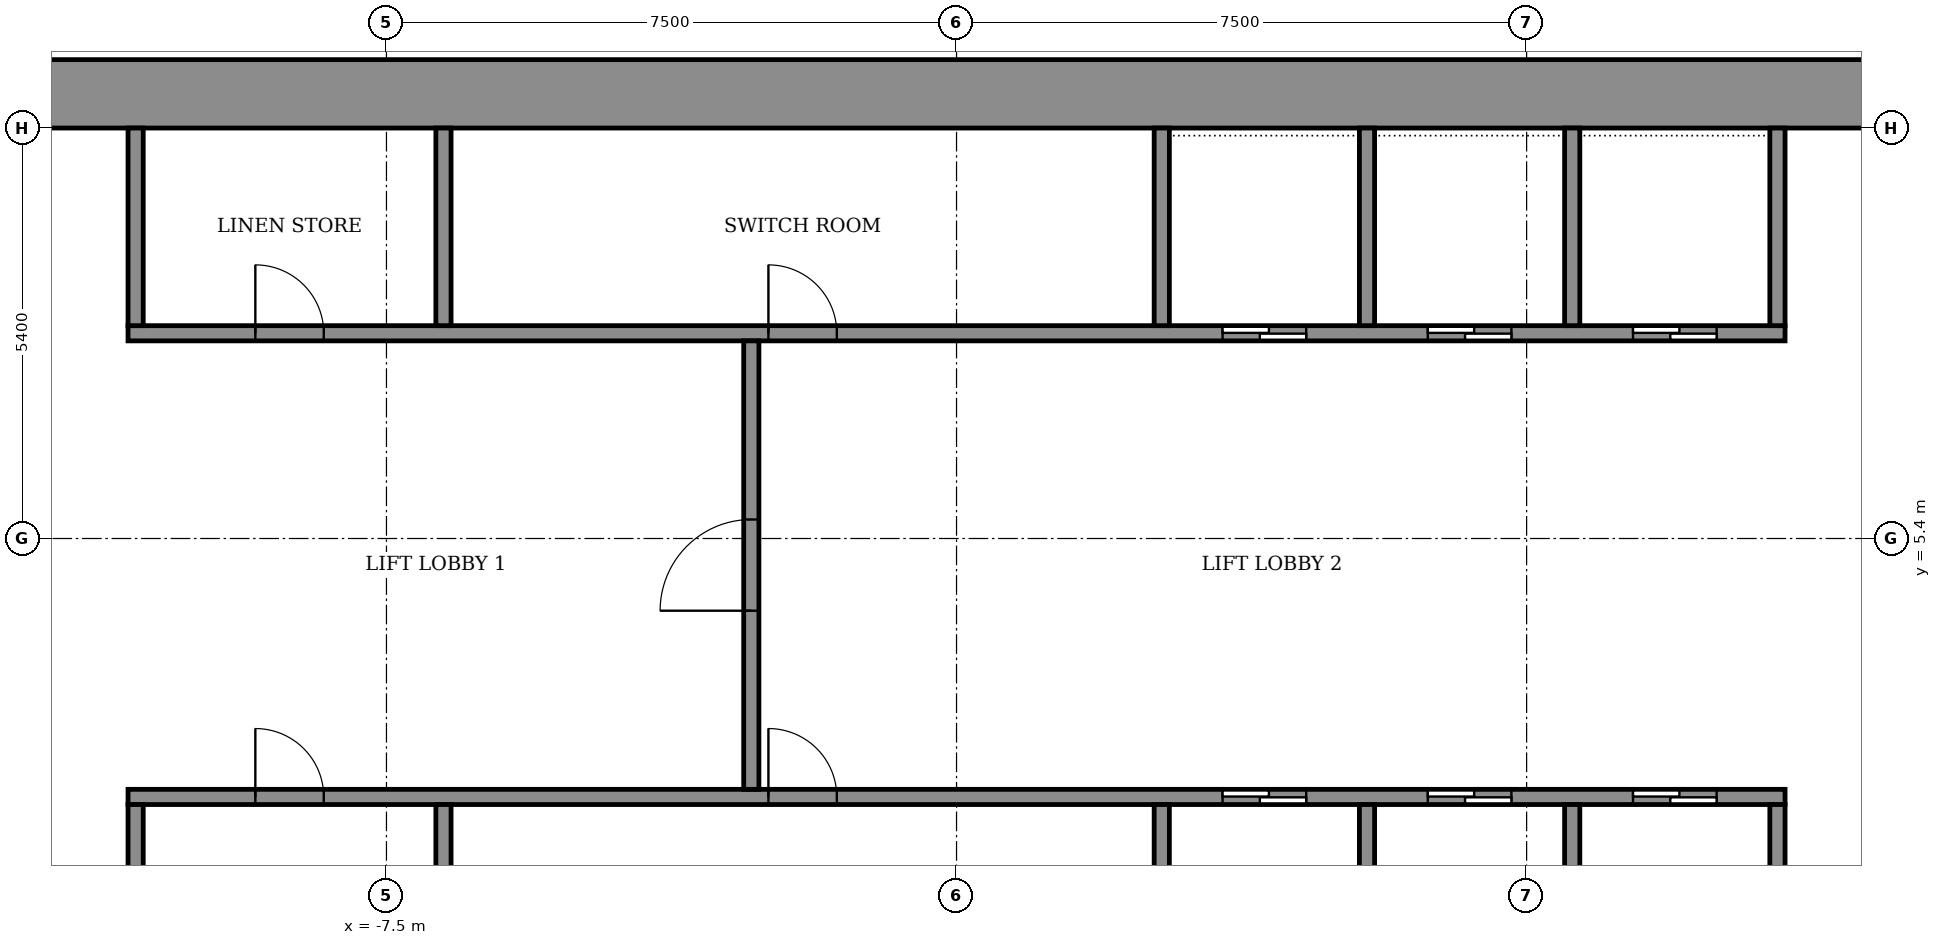
"""IFC4 building model, lengths in metres.
Left out: names, types, materials, properties, quantities, classifications, styles, units other than length and angle.
Written with IfcOpenShell. Run it as: python <this file> out.ifc"""

import sys

from ifc_helpers import new_model, si_unit, direction, frame, frame_2d, origin, place, context, subcontext, project, spatial, rectangle, extrude, element, fill, save


model = new_model("IFC4")
c1 = context("Model", 3, precision=1e-05, world=origin(), true_north=direction((0.0, 1.0)))
c2 = subcontext(c1, "Body", "Model", "MODEL_VIEW")
j1 = project(units=[si_unit("LENGTHUNIT", "METRE"), si_unit("PLANEANGLEUNIT", "RADIAN")], contexts=[c1])
p1 = place(None, origin())
s1 = spatial("IfcSite", under=j1, at=p1, CompositionType="ELEMENT")
p2 = place(p1, origin())
s2 = spatial("IfcBuilding", under=s1, at=p2, CompositionType="ELEMENT")
p3 = place(p2, frame((0.0, 0.0, 140.9)))
s3 = spatial("IfcBuildingStorey", under=s2, at=p3, CompositionType="ELEMENT", Elevation=140.9)
p4 = place(p3, frame((-14.7, 11.25, 0.0), z_axis=(0.0, 0.0, 1.0), x_axis=(1.0, 0.0, 0.0)))
e1 = element("IfcWall", 1, at=p4, inside=s3, PredefinedType="SHEAR", context=c2, shape_type="SweptSolid", body=[
    extrude(rectangle(XDim=29.4, YDim=0.9, at=frame_2d((14.7, 0.0))), origin(), (0.0, 0.0, 1.0), 3.6),
])
p5 = place(p3, frame((-10.9, 2.0, 0.0), z_axis=(0.0, 0.0, 1.0), x_axis=(1.0, 0.0, 0.0)))
e2 = element("IfcWall", 2, at=p5, inside=s3, PredefinedType="SHEAR", context=c2, shape_type="SweptSolid", body=[
    extrude(rectangle(XDim=21.8, YDim=0.2, at=frame_2d((10.9, 0.0))), origin(), (0.0, 0.0, 1.0), 3.05),
])
p6 = place(p5, frame((14.4, 0.0, 0.0)))
e3 = element("IfcOpeningElement", 3, at=p6, cuts=e2, PredefinedType="OPENING", context=c2, shape_type="SweptSolid", body=[
    extrude(rectangle(XDim=1.1, YDim=2.1, at=frame_2d((0.55, 1.05))), frame((0.0, 0.11, 0.0), z_axis=(0.0, -1.0, 0.0), x_axis=(1.0, 0.0, 0.0)), (0.0, 0.0, 1.0), 0.22),
])
p7 = place(p5, frame((17.1, 0.0, 0.0)))
e4 = element("IfcOpeningElement", 4, at=p7, cuts=e2, PredefinedType="OPENING", context=c2, shape_type="SweptSolid", body=[
    extrude(rectangle(XDim=1.1, YDim=2.1, at=frame_2d((0.55, 1.05))), frame((0.0, 0.11, 0.0), z_axis=(0.0, -1.0, 0.0), x_axis=(1.0, 0.0, 0.0)), (0.0, 0.0, 1.0), 0.22),
])
p8 = place(p5, frame((19.8, 0.0, 0.0)))
e5 = element("IfcOpeningElement", 5, at=p8, cuts=e2, PredefinedType="OPENING", context=c2, shape_type="SweptSolid", body=[
    extrude(rectangle(XDim=1.1, YDim=2.1, at=frame_2d((0.55, 1.05))), frame((0.0, 0.11, 0.0), z_axis=(0.0, -1.0, 0.0), x_axis=(1.0, 0.0, 0.0)), (0.0, 0.0, 1.0), 0.22),
])
p9 = place(p5, frame((1.675, 0.0, 0.0)))
e6 = element("IfcOpeningElement", 6, at=p9, cuts=e2, PredefinedType="OPENING", context=c2, shape_type="SweptSolid", body=[
    extrude(rectangle(XDim=0.9, YDim=2.1, at=frame_2d((0.45, 1.05))), frame((0.0, 0.11, 0.0), z_axis=(0.0, -1.0, 0.0), x_axis=(1.0, 0.0, 0.0)), (0.0, 0.0, 1.0), 0.22),
])
p10 = place(p5, frame((8.425, 0.0, 0.0)))
e7 = element("IfcOpeningElement", 7, at=p10, cuts=e2, PredefinedType="OPENING", context=c2, shape_type="SweptSolid", body=[
    extrude(rectangle(XDim=0.9, YDim=2.1, at=frame_2d((0.45, 1.05))), frame((0.0, 0.11, 0.0), z_axis=(0.0, -1.0, 0.0), x_axis=(1.0, 0.0, 0.0)), (0.0, 0.0, 1.0), 0.22),
])
p11 = place(p3, frame((-10.9, 8.1, 0.0), z_axis=(0.0, 0.0, 1.0), x_axis=(1.0, 0.0, 0.0)))
e8 = element("IfcWall", 8, at=p11, inside=s3, PredefinedType="SHEAR", context=c2, shape_type="SweptSolid", body=[
    extrude(rectangle(XDim=21.8, YDim=0.2, at=frame_2d((10.9, 0.0))), origin(), (0.0, 0.0, 1.0), 3.05),
])
p12 = place(p11, frame((14.4, 0.0, 0.0)))
e9 = element("IfcOpeningElement", 9, at=p12, cuts=e8, PredefinedType="OPENING", context=c2, shape_type="SweptSolid", body=[
    extrude(rectangle(XDim=1.1, YDim=2.1, at=frame_2d((0.55, 1.05))), frame((0.0, 0.11, 0.0), z_axis=(0.0, -1.0, 0.0), x_axis=(1.0, 0.0, 0.0)), (0.0, 0.0, 1.0), 0.22),
])
p13 = place(p11, frame((17.1, 0.0, 0.0)))
e10 = element("IfcOpeningElement", 10, at=p13, cuts=e8, PredefinedType="OPENING", context=c2, shape_type="SweptSolid", body=[
    extrude(rectangle(XDim=1.1, YDim=2.1, at=frame_2d((0.55, 1.05))), frame((0.0, 0.11, 0.0), z_axis=(0.0, -1.0, 0.0), x_axis=(1.0, 0.0, 0.0)), (0.0, 0.0, 1.0), 0.22),
])
p14 = place(p11, frame((19.8, 0.0, 0.0)))
e11 = element("IfcOpeningElement", 11, at=p14, cuts=e8, PredefinedType="OPENING", context=c2, shape_type="SweptSolid", body=[
    extrude(rectangle(XDim=1.1, YDim=2.1, at=frame_2d((0.55, 1.05))), frame((0.0, 0.11, 0.0), z_axis=(0.0, -1.0, 0.0), x_axis=(1.0, 0.0, 0.0)), (0.0, 0.0, 1.0), 0.22),
])
p15 = place(p11, frame((1.675, 0.0, 0.0)))
e12 = element("IfcOpeningElement", 12, at=p15, cuts=e8, PredefinedType="OPENING", context=c2, shape_type="SweptSolid", body=[
    extrude(rectangle(XDim=0.9, YDim=2.1, at=frame_2d((0.45, 1.05))), frame((0.0, 0.11, 0.0), z_axis=(0.0, -1.0, 0.0), x_axis=(1.0, 0.0, 0.0)), (0.0, 0.0, 1.0), 0.22),
])
p16 = place(p11, frame((8.425, 0.0, 0.0)))
e13 = element("IfcOpeningElement", 13, at=p16, cuts=e8, PredefinedType="OPENING", context=c2, shape_type="SweptSolid", body=[
    extrude(rectangle(XDim=0.9, YDim=2.1, at=frame_2d((0.45, 1.05))), frame((0.0, 0.11, 0.0), z_axis=(0.0, -1.0, 0.0), x_axis=(1.0, 0.0, 0.0)), (0.0, 0.0, 1.0), 0.22),
])
for number, where, z_axis, x_axis in (
    (14, (-10.8, -0.6, 0.0), (0.0, 0.0, 1.0), (0.0, 1.0, 0.0)),
    (15, (-6.75, -0.6, 0.0), (0.0, 0.0, 1.0), (0.0, 1.0, 0.0)),
):
    element("IfcWall", number, at=place(p3, frame(where, z_axis=z_axis, x_axis=x_axis)), inside=s3, PredefinedType="STANDARD", context=c2, shape_type="SweptSolid", body=[
        extrude(rectangle(XDim=2.5, YDim=0.2, at=frame_2d((1.25, 0.0))), origin(), (0.0, 0.0, 1.0), 3.05),
    ])
for number, where, z_axis, x_axis in (
    (16, (2.7, -0.6, 0.0), (0.0, 0.0, 1.0), (0.0, 1.0, 0.0)),
    (17, (5.4, -0.6, 0.0), (0.0, 0.0, 1.0), (0.0, 1.0, 0.0)),
    (18, (8.1, -0.6, 0.0), (0.0, 0.0, 1.0), (0.0, 1.0, 0.0)),
    (19, (10.8, -0.6, 0.0), (0.0, 0.0, 1.0), (0.0, 1.0, 0.0)),
):
    element("IfcWall", number, at=place(p3, frame(where, z_axis=z_axis, x_axis=x_axis)), inside=s3, PredefinedType="SHEAR", context=c2, shape_type="SweptSolid", body=[
        extrude(rectangle(XDim=2.5, YDim=0.2, at=frame_2d((1.25, 0.0))), origin(), (0.0, 0.0, 1.0), 3.05),
    ])
for number, where, z_axis, x_axis in (
    (20, (-10.8, 8.2, 0.0), (0.0, 0.0, 1.0), (0.0, 1.0, 0.0)),
    (21, (-6.75, 8.2, 0.0), (0.0, 0.0, 1.0), (0.0, 1.0, 0.0)),
):
    element("IfcWall", number, at=place(p3, frame(where, z_axis=z_axis, x_axis=x_axis)), inside=s3, PredefinedType="STANDARD", context=c2, shape_type="SweptSolid", body=[
        extrude(rectangle(XDim=2.6, YDim=0.2, at=frame_2d((1.3, 0.0))), origin(), (0.0, 0.0, 1.0), 3.05),
    ])
for number, where, z_axis, x_axis in (
    (22, (2.7, 8.2, 0.0), (0.0, 0.0, 1.0), (0.0, 1.0, 0.0)),
    (23, (5.4, 8.2, 0.0), (0.0, 0.0, 1.0), (0.0, 1.0, 0.0)),
    (24, (8.1, 8.2, 0.0), (0.0, 0.0, 1.0), (0.0, 1.0, 0.0)),
    (25, (10.8, 8.2, 0.0), (0.0, 0.0, 1.0), (0.0, 1.0, 0.0)),
):
    element("IfcWall", number, at=place(p3, frame(where, z_axis=z_axis, x_axis=x_axis)), inside=s3, PredefinedType="SHEAR", context=c2, shape_type="SweptSolid", body=[
        extrude(rectangle(XDim=2.6, YDim=0.2, at=frame_2d((1.3, 0.0))), origin(), (0.0, 0.0, 1.0), 3.05),
    ])
p17 = place(p3, frame((-2.7, 2.1, 0.0), z_axis=(0.0, 0.0, 1.0), x_axis=(0.0, 1.0, 0.0)))
e26 = element("IfcWall", 26, at=p17, inside=s3, PredefinedType="STANDARD", context=c2, shape_type="SweptSolid", body=[
    extrude(rectangle(XDim=5.9, YDim=0.2, at=frame_2d((2.95, 0.0))), origin(), (0.0, 0.0, 1.0), 3.05),
])
p18 = place(p17, frame((2.35, 0.0, 0.0)))
e27 = element("IfcOpeningElement", 27, at=p18, cuts=e26, PredefinedType="OPENING", context=c2, shape_type="SweptSolid", body=[
    extrude(rectangle(XDim=1.2, YDim=2.1, at=frame_2d((0.6, 1.05))), frame((0.0, 0.11, 0.0), z_axis=(0.0, -1.0, 0.0), x_axis=(1.0, 0.0, 0.0)), (0.0, 0.0, 1.0), 0.22),
])
p19 = place(p6, origin())
e28 = element("IfcDoor", 28, at=p19, inside=s3, OperationType="SLIDING_TO_LEFT", PredefinedType="DOOR", context=c2, shape_type="SweptSolid", body=[
    extrude(rectangle(XDim=1.1, YDim=2.1, at=frame_2d((0.55, 1.05))), frame((0.0, 0.025, 0.0), z_axis=(0.0, -1.0, 0.0), x_axis=(1.0, 0.0, 0.0)), (0.0, 0.0, 1.0), 0.05),
])
fill(e3, e28)
p20 = place(p7, origin())
e29 = element("IfcDoor", 29, at=p20, inside=s3, OperationType="SLIDING_TO_LEFT", PredefinedType="DOOR", context=c2, shape_type="SweptSolid", body=[
    extrude(rectangle(XDim=1.1, YDim=2.1, at=frame_2d((0.55, 1.05))), frame((0.0, 0.025, 0.0), z_axis=(0.0, -1.0, 0.0), x_axis=(1.0, 0.0, 0.0)), (0.0, 0.0, 1.0), 0.05),
])
fill(e4, e29)
p21 = place(p8, origin())
e30 = element("IfcDoor", 30, at=p21, inside=s3, OperationType="SLIDING_TO_LEFT", PredefinedType="DOOR", context=c2, shape_type="SweptSolid", body=[
    extrude(rectangle(XDim=1.1, YDim=2.1, at=frame_2d((0.55, 1.05))), frame((0.0, 0.025, 0.0), z_axis=(0.0, -1.0, 0.0), x_axis=(1.0, 0.0, 0.0)), (0.0, 0.0, 1.0), 0.05),
])
fill(e5, e30)
p22 = place(p12, origin())
e31 = element("IfcDoor", 31, at=p22, inside=s3, OperationType="SLIDING_TO_LEFT", PredefinedType="DOOR", context=c2, shape_type="SweptSolid", body=[
    extrude(rectangle(XDim=1.1, YDim=2.1, at=frame_2d((0.55, 1.05))), frame((0.0, 0.025, 0.0), z_axis=(0.0, -1.0, 0.0), x_axis=(1.0, 0.0, 0.0)), (0.0, 0.0, 1.0), 0.05),
])
fill(e9, e31)
p23 = place(p13, origin())
e32 = element("IfcDoor", 32, at=p23, inside=s3, OperationType="SLIDING_TO_LEFT", PredefinedType="DOOR", context=c2, shape_type="SweptSolid", body=[
    extrude(rectangle(XDim=1.1, YDim=2.1, at=frame_2d((0.55, 1.05))), frame((0.0, 0.025, 0.0), z_axis=(0.0, -1.0, 0.0), x_axis=(1.0, 0.0, 0.0)), (0.0, 0.0, 1.0), 0.05),
])
fill(e10, e32)
p24 = place(p14, origin())
e33 = element("IfcDoor", 33, at=p24, inside=s3, OperationType="SLIDING_TO_LEFT", PredefinedType="DOOR", context=c2, shape_type="SweptSolid", body=[
    extrude(rectangle(XDim=1.1, YDim=2.1, at=frame_2d((0.55, 1.05))), frame((0.0, 0.025, 0.0), z_axis=(0.0, -1.0, 0.0), x_axis=(1.0, 0.0, 0.0)), (0.0, 0.0, 1.0), 0.05),
])
fill(e11, e33)
p25 = place(p9, origin())
e34 = element("IfcDoor", 34, at=p25, inside=s3, OperationType="SINGLE_SWING_RIGHT", PredefinedType="DOOR", context=c2, shape_type="SweptSolid", body=[
    extrude(rectangle(XDim=0.9, YDim=2.1, at=frame_2d((0.45, 1.05))), frame((0.0, 0.025, 0.0), z_axis=(0.0, -1.0, 0.0), x_axis=(1.0, 0.0, 0.0)), (0.0, 0.0, 1.0), 0.05),
])
fill(e6, e34)
p26 = place(p10, origin())
e35 = element("IfcDoor", 35, at=p26, inside=s3, OperationType="SINGLE_SWING_LEFT", PredefinedType="DOOR", context=c2, shape_type="SweptSolid", body=[
    extrude(rectangle(XDim=0.9, YDim=2.1, at=frame_2d((0.45, 1.05))), frame((0.0, 0.025, 0.0), z_axis=(0.0, -1.0, 0.0), x_axis=(1.0, 0.0, 0.0)), (0.0, 0.0, 1.0), 0.05),
])
fill(e7, e35)
p27 = place(p15, origin())
e36 = element("IfcDoor", 36, at=p27, inside=s3, OperationType="SINGLE_SWING_RIGHT", PredefinedType="DOOR", context=c2, shape_type="SweptSolid", body=[
    extrude(rectangle(XDim=0.9, YDim=2.1, at=frame_2d((0.45, 1.05))), frame((0.0, 0.025, 0.0), z_axis=(0.0, -1.0, 0.0), x_axis=(1.0, 0.0, 0.0)), (0.0, 0.0, 1.0), 0.05),
])
fill(e12, e36)
p28 = place(p16, origin())
e37 = element("IfcDoor", 37, at=p28, inside=s3, OperationType="SINGLE_SWING_LEFT", PredefinedType="DOOR", context=c2, shape_type="SweptSolid", body=[
    extrude(rectangle(XDim=0.9, YDim=2.1, at=frame_2d((0.45, 1.05))), frame((0.0, 0.025, 0.0), z_axis=(0.0, -1.0, 0.0), x_axis=(1.0, 0.0, 0.0)), (0.0, 0.0, 1.0), 0.05),
])
fill(e13, e37)
p29 = place(p18, origin())
e38 = element("IfcDoor", 38, at=p29, inside=s3, OperationType="SINGLE_SWING_LEFT", PredefinedType="DOOR", context=c2, shape_type="SweptSolid", body=[
    extrude(rectangle(XDim=1.2, YDim=2.1, at=frame_2d((0.6, 1.05))), frame((0.0, 0.025, 0.0), z_axis=(0.0, -1.0, 0.0), x_axis=(1.0, 0.0, 0.0)), (0.0, 0.0, 1.0), 0.05),
])
fill(e27, e38)
save(model, sys.argv[1])
